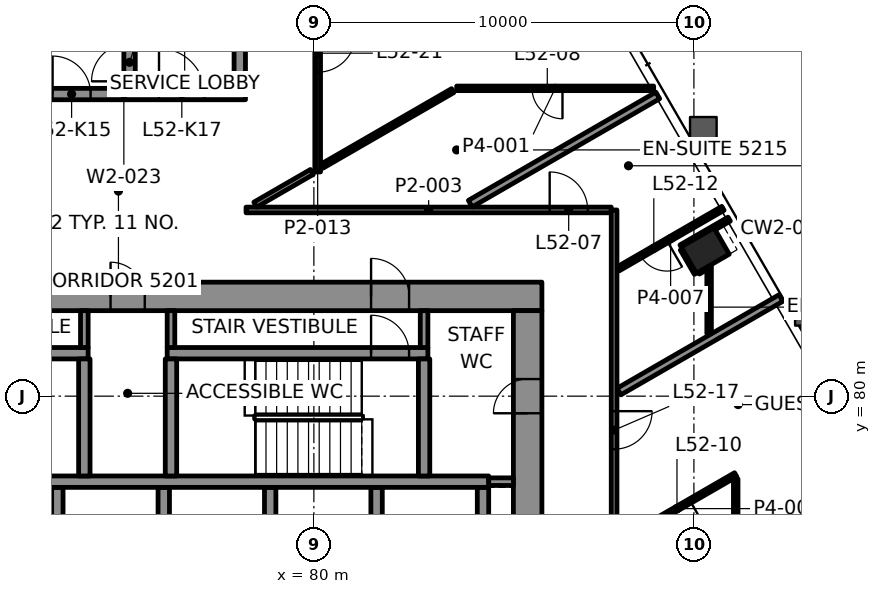
"""IFC4 building model, lengths in metres.
Left out: names, types, materials, properties, quantities, classifications, styles, units other than length and angle.
Written with IfcOpenShell. Run it as: python <this file> out.ifc"""

import sys

from ifc_helpers import new_model, si_unit, direction, frame, frame_2d, origin, origin_2d, place, context, subcontext, project, spatial, rectangle, hollow_rectangle, extrude, element, fill, save


model = new_model("IFC4")
c1 = context("Model", 3, precision=1e-05, world=origin(), true_north=direction((0.0, 1.0)))
c2 = subcontext(c1, "Body", "Model", "MODEL_VIEW")
j1 = project(units=[si_unit("LENGTHUNIT", "METRE"), si_unit("PLANEANGLEUNIT", "RADIAN")], contexts=[c1])
p1 = place(None, origin())
s1 = spatial("IfcSite", under=j1, at=p1, CompositionType="ELEMENT")
p2 = place(p1, origin())
s2 = spatial("IfcBuilding", under=s1, at=p2, CompositionType="ELEMENT")
p3 = place(p2, frame((0.0, 0.0, 222.1)))
s3 = spatial("IfcBuildingStorey", under=s2, at=p3, CompositionType="ELEMENT", Elevation=222.1)
p4 = place(p3, frame((90.297, 83.832, -0.0), z_axis=(0.0, 0.0, 1.0), x_axis=(-0.5, 0.866025403784, 0.0)))
e1 = element("IfcColumn", 1, at=p4, inside=s3, PredefinedType="COLUMN", context=c2, shape_type="SweptSolid", body=[
    extrude(hollow_rectangle(XDim=0.8, YDim=1.0, WallThickness=0.05, at=origin_2d()), origin(), (0.0, 0.0, 1.0), 3.9),
])
p5 = place(p3, frame((64.0, 82.625, 0.0), z_axis=(0.0, 0.0, 1.0), x_axis=(1.0, 0.0, 0.0)))
e2 = element("IfcWall", 2, at=p5, inside=s3, PredefinedType="SHEAR", context=c2, shape_type="SweptSolid", body=[
    extrude(rectangle(XDim=22.0, YDim=0.75, at=frame_2d((11.0, 0.0))), origin(), (0.0, 0.0, 1.0), 3.7),
])
p6 = place(p5, frame((3.695, 0.0, 0.0)))
e3 = element("IfcOpeningElement", 3, at=p6, cuts=e2, PredefinedType="OPENING", context=c2, shape_type="SweptSolid", body=[
    extrude(rectangle(XDim=1.0, YDim=2.1, at=frame_2d((0.5, 1.05))), frame((0.0, 0.385, 0.0), z_axis=(0.0, -1.0, 0.0), x_axis=(1.0, 0.0, 0.0)), (0.0, 0.0, 1.0), 0.77),
])
p7 = place(p5, frame((17.505, 0.0, 0.0)))
e4 = element("IfcOpeningElement", 4, at=p7, cuts=e2, PredefinedType="OPENING", context=c2, shape_type="SweptSolid", body=[
    extrude(rectangle(XDim=1.0, YDim=2.1, at=frame_2d((0.5, 1.05))), frame((0.0, 0.385, 0.0), z_axis=(0.0, -1.0, 0.0), x_axis=(1.0, 0.0, 0.0)), (0.0, 0.0, 1.0), 0.77),
])
p8 = place(p5, frame((10.65, 0.0, 0.0)))
e5 = element("IfcOpeningElement", 5, at=p8, cuts=e2, PredefinedType="OPENING", context=c2, shape_type="SweptSolid", body=[
    extrude(rectangle(XDim=0.9, YDim=2.1, at=frame_2d((0.45, 1.05))), frame((0.0, 0.385, 0.0), z_axis=(0.0, -1.0, 0.0), x_axis=(1.0, 0.0, 0.0)), (0.0, 0.0, 1.0), 0.77),
])
p9 = place(p3, frame((85.625, 67.75, 0.0), z_axis=(0.0, 0.0, 1.0), x_axis=(0.0, 1.0, 0.0)))
e6 = element("IfcWall", 6, at=p9, inside=s3, PredefinedType="SHEAR", context=c2, shape_type="SweptSolid", body=[
    extrude(rectangle(XDim=14.5, YDim=0.75, at=frame_2d((7.25, 0.0))), origin(), (0.0, 0.0, 1.0), 3.7),
])
p10 = place(p9, frame((4.65, 0.0, 0.0)))
e7 = element("IfcOpeningElement", 7, at=p10, cuts=e6, PredefinedType="OPENING", context=c2, shape_type="SweptSolid", body=[
    extrude(rectangle(XDim=1.8, YDim=2.1, at=frame_2d((0.9, 1.05))), frame((0.0, 0.385, 0.0), z_axis=(0.0, -1.0, 0.0), x_axis=(1.0, 0.0, 0.0)), (0.0, 0.0, 1.0), 0.77),
])
p11 = place(p9, frame((11.8, 0.0, 0.0)))
e8 = element("IfcOpeningElement", 8, at=p11, cuts=e6, PredefinedType="OPENING", context=c2, shape_type="SweptSolid", body=[
    extrude(rectangle(XDim=0.9, YDim=2.1, at=frame_2d((0.45, 1.05))), frame((0.0, 0.385, 0.0), z_axis=(0.0, -1.0, 0.0), x_axis=(1.0, 0.0, 0.0)), (0.0, 0.0, 1.0), 0.77),
])
for number, where, z_axis, x_axis in (
    (9, (73.25, 75.0, 0.0), (0.0, 0.0, 1.0), (0.0, 1.0, 0.0)),
    (10, (76.05, 75.0, 0.0), (0.0, 0.0, 1.0), (0.0, 1.0, 0.0)),
    (11, (78.85, 75.0, 0.0), (0.0, 0.0, 1.0), (0.0, 1.0, 0.0)),
    (12, (81.65, 75.0, 0.0), (0.0, 0.0, 1.0), (0.0, 1.0, 0.0)),
    (13, (84.45, 75.0, 0.0), (0.0, 0.0, 1.0), (0.0, 1.0, 0.0)),
):
    element("IfcWall", number, at=place(p3, frame(where, z_axis=z_axis, x_axis=x_axis)), inside=s3, PredefinedType="SHEAR", context=c2, shape_type="SweptSolid", body=[
        extrude(rectangle(XDim=2.6, YDim=0.3, at=frame_2d((1.3, 0.0))), origin(), (0.0, 0.0, 1.0), 3.7),
    ])
p12 = place(p3, frame((67.15, 77.75, 0.0), z_axis=(0.0, 0.0, 1.0), x_axis=(1.0, 0.0, 0.0)))
e14 = element("IfcWall", 14, at=p12, inside=s3, PredefinedType="SHEAR", context=c2, shape_type="SweptSolid", body=[
    extrude(rectangle(XDim=17.45, YDim=0.3, at=frame_2d((8.725, 0.0))), origin(), (0.0, 0.0, 1.0), 3.7),
])
p13 = place(p12, frame((0.545, 0.0, 0.0)))
e15 = element("IfcOpeningElement", 15, at=p13, cuts=e14, PredefinedType="OPENING", context=c2, shape_type="SweptSolid", body=[
    extrude(rectangle(XDim=1.0, YDim=2.1, at=frame_2d((0.5, 1.05))), frame((0.0, 0.16, 0.0), z_axis=(0.0, -1.0, 0.0), x_axis=(1.0, 0.0, 0.0)), (0.0, 0.0, 1.0), 0.32),
])
p14 = place(p3, frame((67.15, 81.13, 0.0), z_axis=(0.0, 0.0, 1.0), x_axis=(1.0, 0.0, 0.0)))
e16 = element("IfcWall", 16, at=p14, inside=s3, PredefinedType="SHEAR", context=c2, shape_type="SweptSolid", body=[
    extrude(rectangle(XDim=6.91, YDim=0.3, at=frame_2d((3.455, 0.0))), origin(), (0.0, 0.0, 1.0), 3.7),
])
p15 = place(p14, frame((0.545, 0.0, 0.0)))
e17 = element("IfcOpeningElement", 17, at=p15, cuts=e16, PredefinedType="OPENING", context=c2, shape_type="SweptSolid", body=[
    extrude(rectangle(XDim=1.0, YDim=2.1, at=frame_2d((0.5, 1.05))), frame((0.0, 0.16, 0.0), z_axis=(0.0, -1.0, 0.0), x_axis=(1.0, 0.0, 0.0)), (0.0, 0.0, 1.0), 0.32),
])
p16 = place(p3, frame((76.14, 81.13, 0.0), z_axis=(0.0, 0.0, 1.0), x_axis=(1.0, 0.0, 0.0)))
e18 = element("IfcWall", 18, at=p16, inside=s3, PredefinedType="SHEAR", context=c2, shape_type="SweptSolid", body=[
    extrude(rectangle(XDim=6.86, YDim=0.3, at=frame_2d((3.43, 0.0))), origin(), (0.0, 0.0, 1.0), 3.7),
])
p17 = place(p16, frame((5.365, 0.0, 0.0)))
e19 = element("IfcOpeningElement", 19, at=p17, cuts=e18, PredefinedType="OPENING", context=c2, shape_type="SweptSolid", body=[
    extrude(rectangle(XDim=1.0, YDim=2.1, at=frame_2d((0.5, 1.05))), frame((0.0, 0.16, 0.0), z_axis=(0.0, -1.0, 0.0), x_axis=(1.0, 0.0, 0.0)), (0.0, 0.0, 1.0), 0.32),
])
for number, where, z_axis, x_axis in (
    (20, (73.96, 77.9, 0.0), (0.0, 0.0, 1.0), (0.0, 1.0, 0.0)),
    (21, (76.24, 77.9, 0.0), (0.0, 0.0, 1.0), (0.0, 1.0, 0.0)),
    (22, (82.9, 77.9, 0.0), (0.0, 0.0, 1.0), (0.0, 1.0, 0.0)),
):
    element("IfcWall", number, at=place(p3, frame(where, z_axis=z_axis, x_axis=x_axis)), inside=s3, PredefinedType="SHEAR", context=c2, shape_type="SweptSolid", body=[
        extrude(rectangle(XDim=3.08, YDim=0.3, at=frame_2d((1.54, 0.0))), origin(), (0.0, 0.0, 1.0), 3.7),
    ])
p18 = place(p3, frame((71.8, 87.95, 0.0), z_axis=(0.0, 0.0, 1.0), x_axis=(1.0, 0.0, 0.0)))
e23 = element("IfcWall", 23, at=p18, inside=s3, PredefinedType="SHEAR", context=c2, shape_type="SweptSolid", body=[
    extrude(rectangle(XDim=6.4, YDim=0.3, at=frame_2d((3.2, 0.0))), origin(), (0.0, 0.0, 1.0), 3.7),
])
p19 = place(p18, frame((1.325, 0.0, 0.0)))
e24 = element("IfcOpeningElement", 24, at=p19, cuts=e23, PredefinedType="OPENING", context=c2, shape_type="SweptSolid", body=[
    extrude(rectangle(XDim=1.0, YDim=2.1, at=frame_2d((0.5, 1.05))), frame((0.0, 0.16, 0.0), z_axis=(0.0, -1.0, 0.0), x_axis=(1.0, 0.0, 0.0)), (0.0, 0.0, 1.0), 0.32),
])
p20 = place(p18, frame((4.125, 0.0, 0.0)))
e25 = element("IfcOpeningElement", 25, at=p20, cuts=e23, PredefinedType="OPENING", context=c2, shape_type="SweptSolid", body=[
    extrude(rectangle(XDim=1.2, YDim=2.1, at=frame_2d((0.6, 1.05))), frame((0.0, 0.16, 0.0), z_axis=(0.0, -1.0, 0.0), x_axis=(1.0, 0.0, 0.0)), (0.0, 0.0, 1.0), 0.32),
])
p21 = place(p3, frame((78.05, 88.1, 0.0), z_axis=(0.0, 0.0, 1.0), x_axis=(0.0, 1.0, 0.0)))
e26 = element("IfcWall", 26, at=p21, inside=s3, PredefinedType="SHEAR", context=c2, shape_type="SweptSolid", body=[
    extrude(rectangle(XDim=6.2, YDim=0.3, at=frame_2d((3.1, 0.0))), origin(), (0.0, 0.0, 1.0), 3.7),
])
p22 = place(p3, frame((75.15, 88.1, 0.0), z_axis=(0.0, 0.0, 1.0), x_axis=(0.0, 1.0, 0.0)))
e27 = element("IfcWall", 27, at=p22, inside=s3, PredefinedType="SHEAR", context=c2, shape_type="SweptSolid", body=[
    extrude(rectangle(XDim=6.2, YDim=0.3, at=frame_2d((3.1, 0.0))), origin(), (0.0, 0.0, 1.0), 3.7),
])
p23 = place(p22, frame((0.185, 0.0, 0.0)))
e28 = element("IfcOpeningElement", 28, at=p23, cuts=e27, PredefinedType="OPENING", context=c2, shape_type="SweptSolid", body=[
    extrude(rectangle(XDim=1.0, YDim=2.1, at=frame_2d((0.5, 1.05))), frame((0.0, 0.16, 0.0), z_axis=(0.0, -1.0, 0.0), x_axis=(1.0, 0.0, 0.0)), (0.0, 0.0, 1.0), 0.32),
])
p24 = place(p3, frame((78.215, 84.9, 0.0), z_axis=(0.0, 0.0, 1.0), x_axis=(1.0, 0.0, 0.0)))
e29 = element("IfcWall", 29, at=p24, inside=s3, PredefinedType="PARTITIONING", context=c2, shape_type="SweptSolid", body=[
    extrude(rectangle(XDim=9.609, YDim=0.15, at=frame_2d((4.805, 0.0))), origin(), (0.0, 0.0, 1.0), 3.097),
])
p25 = place(p24, frame((7.99, 0.0, 0.0)))
e30 = element("IfcOpeningElement", 30, at=p25, cuts=e29, PredefinedType="OPENING", context=c2, shape_type="SweptSolid", body=[
    extrude(rectangle(XDim=1.0, YDim=2.1, at=frame_2d((0.5, 1.05))), frame((0.0, 0.085, 0.0), z_axis=(0.0, -1.0, 0.0), x_axis=(1.0, 0.0, 0.0)), (0.0, 0.0, 1.0), 0.17),
])
p26 = place(p3, frame((88.941, 88.1, 0.0), z_axis=(0.0, 0.0, 1.0), x_axis=(-1.0, 0.0, 0.0)))
e31 = element("IfcWall", 31, at=p26, inside=s3, PredefinedType="PARTITIONING", context=c2, shape_type="SweptSolid", body=[
    extrude(rectangle(XDim=5.183, YDim=0.12, at=frame_2d((2.592, 0.0))), origin(), (0.0, 0.0, 1.0), 3.022),
])
p27 = place(p26, frame((2.399, 0.0, 0.0)))
e32 = element("IfcOpeningElement", 32, at=p27, cuts=e31, PredefinedType="OPENING", context=c2, shape_type="SweptSolid", body=[
    extrude(rectangle(XDim=0.8, YDim=2.1, at=frame_2d((0.4, 1.05))), frame((0.0, 0.07, 0.0), z_axis=(0.0, -1.0, 0.0), x_axis=(1.0, 0.0, 0.0)), (0.0, 0.0, 1.0), 0.14),
])
p28 = place(p3, frame((91.1, 77.933, 0.0), z_axis=(0.0, 0.0, 1.0), x_axis=(-0.866045460162, -0.499965259726, 0.0)))
e33 = element("IfcWall", 33, at=p28, inside=s3, PredefinedType="PARTITIONING", context=c2, shape_type="SweptSolid", body=[
    extrude(rectangle(XDim=3.569, YDim=0.12, at=frame_2d((1.784, 0.0))), origin(), (0.0, 0.0, 1.0), 3.1),
])
p29 = place(p28, frame((1.384, 0.0, 0.0)))
e34 = element("IfcOpeningElement", 34, at=p29, cuts=e33, PredefinedType="OPENING", context=c2, shape_type="SweptSolid", body=[
    extrude(rectangle(XDim=0.8, YDim=2.1, at=frame_2d((0.4, 1.05))), frame((0.0, 0.07, 0.0), z_axis=(0.0, -1.0, 0.0), x_axis=(1.0, 0.0, 0.0)), (0.0, 0.0, 1.0), 0.14),
])
p30 = place(p3, frame((88.027, 80.12, 0.0), z_axis=(0.0, 0.0, 1.0), x_axis=(0.866024509183, 0.500001549491, 0.0)))
e35 = element("IfcWall", 35, at=p30, inside=s3, PredefinedType="PARTITIONING", context=c2, shape_type="SweptSolid", body=[
    extrude(rectangle(XDim=4.922, YDim=0.2, at=frame_2d((2.461, 0.0))), origin(), (0.0, 0.0, 1.0), 3.022),
])
p31 = place(p3, frame((90.116, 83.265, 0.0), z_axis=(0.0, 0.0, 1.0), x_axis=(0.866036909293, 0.499980071345, 0.0)))
e36 = element("IfcWall", 36, at=p31, inside=s3, PredefinedType="PARTITIONING", context=c2, shape_type="SweptSolid", body=[
    extrude(rectangle(XDim=0.219, YDim=0.12, at=frame_2d((0.109, 0.0))), origin(), (0.0, 0.0, 1.0), 3.1),
])
p32 = place(p3, frame((89.664, 83.928, 0.0), z_axis=(0.0, 0.0, 1.0), x_axis=(0.866032430508, 0.49998782916, 0.0)))
e37 = element("IfcWall", 37, at=p32, inside=s3, PredefinedType="PARTITIONING", context=c2, shape_type="SweptSolid", body=[
    extrude(rectangle(XDim=1.46, YDim=0.12, at=frame_2d((0.73, 0.0))), origin(), (0.0, 0.0, 1.0), 3.022),
])
p33 = place(p3, frame((90.764, 84.942, 0.0), z_axis=(0.0, 0.0, 1.0), x_axis=(-0.866052668871, -0.499952772512, 0.0)))
e38 = element("IfcWall", 38, at=p33, inside=s3, PredefinedType="PARTITIONING", context=c2, shape_type="SweptSolid", body=[
    extrude(rectangle(XDim=3.181, YDim=0.12, at=frame_2d((1.59, 0.0))), origin(), (0.0, 0.0, 1.0), 3.022),
])
p34 = place(p33, frame((1.701, 0.0, 0.0)))
e39 = element("IfcOpeningElement", 39, at=p34, cuts=e38, PredefinedType="OPENING", context=c2, shape_type="SweptSolid", body=[
    extrude(rectangle(XDim=0.8, YDim=2.1, at=frame_2d((0.4, 1.05))), frame((0.0, 0.07, 0.0), z_axis=(0.0, -1.0, 0.0), x_axis=(1.0, 0.0, 0.0)), (0.0, 0.0, 1.0), 0.14),
])
p35 = place(p3, frame((84.115, 85.065, 0.0), z_axis=(0.0, 0.0, 1.0), x_axis=(0.866027152591, 0.499996970966, 0.0)))
e40 = element("IfcWall", 40, at=p35, inside=s3, PredefinedType="PARTITIONING", context=c2, shape_type="SweptSolid", body=[
    extrude(rectangle(XDim=5.697, YDim=0.2, at=frame_2d((2.848, 0.0))), origin(), (0.0, 0.0, 1.0), 3.022),
])
p36 = place(p3, frame((78.458, 85.04, 0.0), z_axis=(0.0, 0.0, 1.0), x_axis=(0.865989383878, 0.500062383118, 0.0)))
e41 = element("IfcWall", 41, at=p36, inside=s3, PredefinedType="PARTITIONING", context=c2, shape_type="SweptSolid", body=[
    extrude(rectangle(XDim=1.72, YDim=0.15, at=frame_2d((0.86, 0.0))), origin(), (0.0, 0.0, 1.0), 3.1),
])
p37 = place(p3, frame((80.209, 86.052, 0.0), z_axis=(0.0, 0.0, 1.0), x_axis=(0.866032250876, 0.499988140302, 0.0)))
e42 = element("IfcWall", 42, at=p37, inside=s3, PredefinedType="PARTITIONING", context=c2, shape_type="SweptSolid", body=[
    extrude(rectangle(XDim=3.977, YDim=0.12, at=frame_2d((1.989, 0.0))), origin(), (0.0, 0.0, 1.0), 3.1),
])
p38 = place(p3, frame((91.1, 74.8, 0.0), z_axis=(0.0, 0.0, 1.0), x_axis=(0.0, 1.0, 0.0)))
e43 = element("IfcWall", 43, at=p38, inside=s3, PredefinedType="PARTITIONING", context=c2, shape_type="SweptSolid", body=[
    extrude(rectangle(XDim=3.023, YDim=0.12, at=frame_2d((1.511, 0.0))), origin(), (0.0, 0.0, 1.0), 3.1),
])
p39 = place(p3, frame((90.4, 81.646, 0.0), z_axis=(0.0, 0.0, 1.0), x_axis=(0.0, 1.0, 0.0)))
e44 = element("IfcWall", 44, at=p39, inside=s3, PredefinedType="PARTITIONING", context=c2, shape_type="SweptSolid", body=[
    extrude(rectangle(XDim=1.784, YDim=0.12, at=frame_2d((0.892, 0.0))), origin(), (0.0, 0.0, 1.0), 3.022),
])
p40 = place(p3, frame((87.9, 84.899, 0.0), z_axis=(0.0, 0.0, 1.0), x_axis=(0.0, -1.0, 0.0)))
e45 = element("IfcWall", 45, at=p40, inside=s3, PredefinedType="PARTITIONING", context=c2, shape_type="SweptSolid", body=[
    extrude(rectangle(XDim=16.308, YDim=0.15, at=frame_2d((8.154, 0.0))), origin(), (0.0, 0.0, 1.0), 3.1),
])
p41 = place(p40, frame((5.294, 0.0, 0.0)))
e46 = element("IfcOpeningElement", 46, at=p41, cuts=e45, PredefinedType="OPENING", context=c2, shape_type="SweptSolid", body=[
    extrude(rectangle(XDim=1.0, YDim=2.1, at=frame_2d((0.5, 1.05))), frame((0.0, 0.085, 0.0), z_axis=(0.0, -1.0, 0.0), x_axis=(1.0, 0.0, 0.0)), (0.0, 0.0, 1.0), 0.17),
])
p42 = place(p40, frame((13.58, 0.0, 0.0)))
e47 = element("IfcOpeningElement", 47, at=p42, cuts=e45, PredefinedType="OPENING", context=c2, shape_type="SweptSolid", body=[
    extrude(rectangle(XDim=1.0, YDim=2.1, at=frame_2d((0.5, 1.05))), frame((0.0, 0.085, 0.0), z_axis=(0.0, -1.0, 0.0), x_axis=(1.0, 0.0, 0.0)), (0.0, 0.0, 1.0), 0.17),
])
p43 = place(p3, frame((80.1, 96.5, 0.0), z_axis=(0.0, 0.0, 1.0), x_axis=(0.0, -1.0, 0.0)))
e48 = element("IfcWall", 48, at=p43, inside=s3, PredefinedType="PARTITIONING", context=c2, shape_type="SweptSolid", body=[
    extrude(rectangle(XDim=10.6, YDim=0.15, at=frame_2d((5.3, 0.0))), origin(), (0.0, 0.0, 1.0), 3.1),
])
p44 = place(p43, frame((1.125, 0.0, 0.0)))
e49 = element("IfcOpeningElement", 49, at=p44, cuts=e48, PredefinedType="OPENING", context=c2, shape_type="SweptSolid", body=[
    extrude(rectangle(XDim=0.9, YDim=2.1, at=frame_2d((0.45, 1.05))), frame((0.0, 0.085, 0.0), z_axis=(0.0, -1.0, 0.0), x_axis=(1.0, 0.0, 0.0)), (0.0, 0.0, 1.0), 0.17),
])
p45 = place(p43, frame((4.299, 0.0, 0.0)))
e50 = element("IfcOpeningElement", 50, at=p45, cuts=e48, PredefinedType="OPENING", context=c2, shape_type="SweptSolid", body=[
    extrude(rectangle(XDim=0.9, YDim=2.1, at=frame_2d((0.45, 1.05))), frame((0.0, 0.085, 0.0), z_axis=(0.0, -1.0, 0.0), x_axis=(1.0, 0.0, 0.0)), (0.0, 0.0, 1.0), 0.17),
])
p46 = place(p43, frame((6.974, 0.0, 0.0)))
e51 = element("IfcOpeningElement", 51, at=p46, cuts=e48, PredefinedType="OPENING", context=c2, shape_type="SweptSolid", body=[
    extrude(rectangle(XDim=1.0, YDim=2.1, at=frame_2d((0.5, 1.05))), frame((0.0, 0.085, 0.0), z_axis=(0.0, -1.0, 0.0), x_axis=(1.0, 0.0, 0.0)), (0.0, 0.0, 1.0), 0.17),
])
p47 = place(p3, frame((90.064, 83.235, 0.0), z_axis=(0.0, 0.0, 1.0), x_axis=(-0.500112705049, 0.865960323715, 0.0)))
e52 = element("IfcWall", 52, at=p47, inside=s3, PredefinedType="PARTITIONING", context=c2, shape_type="SweptSolid", body=[
    extrude(rectangle(XDim=0.74, YDim=0.12, at=frame_2d((0.37, 0.0))), origin(), (0.0, 0.0, 1.0), 3.1),
])
p48 = place(p3, frame((84.6, 77.75, 0.0), z_axis=(0.0, 0.0, 1.0), x_axis=(1.0, 0.0, 0.0)))
e53 = element("IfcWall", 53, at=p48, inside=s3, PredefinedType="PARTITIONING", context=c2, shape_type="SweptSolid", body=[
    extrude(rectangle(XDim=0.65, YDim=0.2, at=frame_2d((0.325, 0.0))), origin(), (0.0, 0.0, 1.0), 3.7),
])
for number, where, z_axis, x_axis in (
    (54, (73.96, 81.28, 0.0), (0.0, 0.0, 1.0), (0.0, 1.0, 0.0)),
    (55, (76.24, 81.28, 0.0), (0.0, 0.0, 1.0), (0.0, 1.0, 0.0)),
    (56, (82.9, 81.28, 0.0), (0.0, 0.0, 1.0), (0.0, 1.0, 0.0)),
):
    element("IfcWall", number, at=place(p3, frame(where, z_axis=z_axis, x_axis=x_axis)), inside=s3, PredefinedType="PARTITIONING", context=c2, shape_type="SweptSolid", body=[
        extrude(rectangle(XDim=0.97, YDim=0.2, at=frame_2d((0.485, 0.0))), origin(), (0.0, 0.0, 1.0), 3.7),
    ])
p49 = place(p25, origin())
e57 = element("IfcDoor", 57, at=p49, inside=s3, OperationType="SINGLE_SWING_LEFT", PredefinedType="DOOR", context=c2, shape_type="SweptSolid", body=[
    extrude(rectangle(XDim=1.0, YDim=2.1, at=frame_2d((0.5, 1.05))), frame((0.0, 0.025, 0.0), z_axis=(0.0, -1.0, 0.0), x_axis=(1.0, 0.0, 0.0)), (0.0, 0.0, 1.0), 0.05),
])
fill(e30, e57)
p50 = place(p27, origin())
e58 = element("IfcDoor", 58, at=p50, inside=s3, OperationType="SINGLE_SWING_LEFT", PredefinedType="DOOR", context=c2, shape_type="SweptSolid", body=[
    extrude(rectangle(XDim=0.8, YDim=2.1, at=frame_2d((0.4, 1.05))), frame((0.0, 0.025, 0.0), z_axis=(0.0, -1.0, 0.0), x_axis=(1.0, 0.0, 0.0)), (0.0, 0.0, 1.0), 0.05),
])
fill(e32, e58)
p51 = place(p29, origin())
e59 = element("IfcDoor", 59, at=p51, inside=s3, OperationType="SINGLE_SWING_LEFT", PredefinedType="DOOR", context=c2, shape_type="SweptSolid", body=[
    extrude(rectangle(XDim=0.8, YDim=2.1, at=frame_2d((0.4, 1.05))), frame((0.0, 0.025, 0.0), z_axis=(0.0, -1.0, 0.0), x_axis=(1.0, 0.0, 0.0)), (0.0, 0.0, 1.0), 0.05),
])
fill(e34, e59)
p52 = place(p34, origin())
e60 = element("IfcDoor", 60, at=p52, inside=s3, OperationType="SINGLE_SWING_LEFT", PredefinedType="DOOR", context=c2, shape_type="SweptSolid", body=[
    extrude(rectangle(XDim=0.8, YDim=2.1, at=frame_2d((0.4, 1.05))), frame((0.0, 0.025, 0.0), z_axis=(0.0, -1.0, 0.0), x_axis=(1.0, 0.0, 0.0)), (0.0, 0.0, 1.0), 0.05),
])
fill(e39, e60)
p53 = place(p41, origin())
e61 = element("IfcDoor", 61, at=p53, inside=s3, OperationType="SINGLE_SWING_RIGHT", PredefinedType="DOOR", context=c2, shape_type="SweptSolid", body=[
    extrude(rectangle(XDim=1.0, YDim=2.1, at=frame_2d((0.5, 1.05))), frame((0.0, 0.025, 0.0), z_axis=(0.0, -1.0, 0.0), x_axis=(1.0, 0.0, 0.0)), (0.0, 0.0, 1.0), 0.05),
])
fill(e46, e61)
p54 = place(p46, origin())
e62 = element("IfcDoor", 62, at=p54, inside=s3, OperationType="SINGLE_SWING_RIGHT", PredefinedType="DOOR", context=c2, shape_type="SweptSolid", body=[
    extrude(rectangle(XDim=1.0, YDim=2.1, at=frame_2d((0.5, 1.05))), frame((0.0, 0.025, 0.0), z_axis=(0.0, -1.0, 0.0), x_axis=(1.0, 0.0, 0.0)), (0.0, 0.0, 1.0), 0.05),
])
fill(e51, e62)
p55 = place(p17, origin())
e63 = element("IfcDoor", 63, at=p55, inside=s3, OperationType="SINGLE_SWING_RIGHT", PredefinedType="DOOR", context=c2, shape_type="SweptSolid", body=[
    extrude(rectangle(XDim=1.0, YDim=2.1, at=frame_2d((0.5, 1.05))), frame((0.0, 0.025, 0.0), z_axis=(0.0, -1.0, 0.0), x_axis=(1.0, 0.0, 0.0)), (0.0, 0.0, 1.0), 0.05),
])
fill(e19, e63)
p56 = place(p7, origin())
e64 = element("IfcDoor", 64, at=p56, inside=s3, OperationType="SINGLE_SWING_LEFT", PredefinedType="DOOR", context=c2, shape_type="SweptSolid", body=[
    extrude(rectangle(XDim=1.0, YDim=2.1, at=frame_2d((0.5, 1.05))), frame((0.0, 0.095, 0.0), z_axis=(0.0, -1.0, 0.0), x_axis=(1.0, 0.0, 0.0)), (0.0, 0.0, 1.0), 0.19),
])
fill(e4, e64)
p57 = place(p19, origin())
e65 = element("IfcDoor", 65, at=p57, inside=s3, OperationType="SINGLE_SWING_RIGHT", PredefinedType="DOOR", context=c2, shape_type="SweptSolid", body=[
    extrude(rectangle(XDim=1.0, YDim=2.1, at=frame_2d((0.5, 1.05))), frame((0.0, 0.025, 0.0), z_axis=(0.0, -1.0, 0.0), x_axis=(1.0, 0.0, 0.0)), (0.0, 0.0, 1.0), 0.05),
])
fill(e24, e65)
p58 = place(p23, origin())
e66 = element("IfcDoor", 66, at=p58, inside=s3, OperationType="SINGLE_SWING_LEFT", PredefinedType="DOOR", context=c2, shape_type="SweptSolid", body=[
    extrude(rectangle(XDim=1.0, YDim=2.1, at=frame_2d((0.5, 1.05))), frame((0.0, 0.025, 0.0), z_axis=(0.0, -1.0, 0.0), x_axis=(1.0, 0.0, 0.0)), (0.0, 0.0, 1.0), 0.05),
])
fill(e28, e66)
p59 = place(p20, origin())
e67 = element("IfcDoor", 67, at=p59, inside=s3, OperationType="SINGLE_SWING_RIGHT", PredefinedType="DOOR", context=c2, shape_type="SweptSolid", body=[
    extrude(rectangle(XDim=1.2, YDim=2.1, at=frame_2d((0.6, 1.05))), frame((0.0, 0.025, 0.0), z_axis=(0.0, -1.0, 0.0), x_axis=(1.0, 0.0, 0.0)), (0.0, 0.0, 1.0), 0.05),
])
fill(e25, e67)
p60 = place(p8, origin())
e68 = element("IfcDoor", 68, at=p60, inside=s3, OperationType="SINGLE_SWING_RIGHT", PredefinedType="DOOR", context=c2, shape_type="SweptSolid", body=[
    extrude(rectangle(XDim=0.9, YDim=2.1, at=frame_2d((0.45, 1.05))), frame((0.0, 0.095, 0.0), z_axis=(0.0, -1.0, 0.0), x_axis=(1.0, 0.0, 0.0)), (0.0, 0.0, 1.0), 0.19),
])
fill(e5, e68)
p61 = place(p11, origin())
e69 = element("IfcDoor", 69, at=p61, inside=s3, OperationType="SINGLE_SWING_LEFT", PredefinedType="DOOR", context=c2, shape_type="SweptSolid", body=[
    extrude(rectangle(XDim=0.9, YDim=2.1, at=frame_2d((0.45, 1.05))), frame((0.0, 0.095, 0.0), z_axis=(0.0, -1.0, 0.0), x_axis=(1.0, 0.0, 0.0)), (0.0, 0.0, 1.0), 0.19),
])
fill(e8, e69)
save(model, sys.argv[1])
